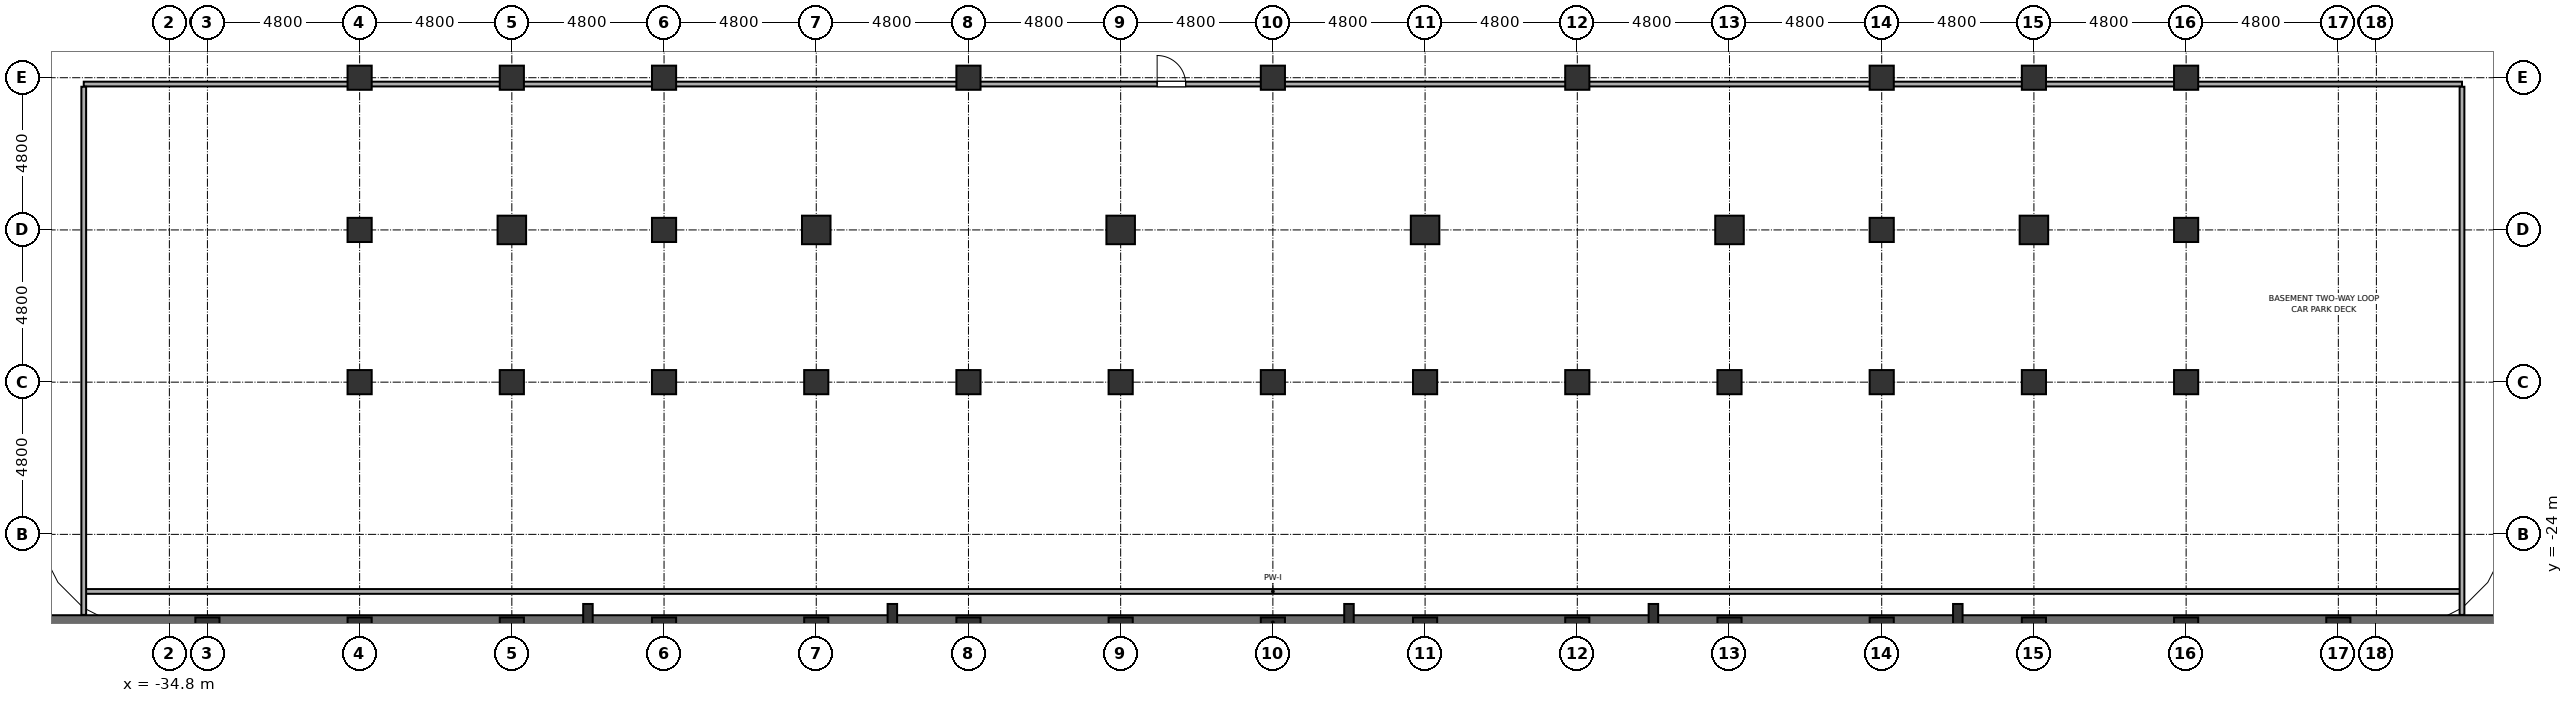
"""IFC4 building model, lengths in metres.
Left out: names, types, materials, properties, quantities, classifications, styles, units other than length and angle.
Written with IfcOpenShell. Run it as: python <this file> out.ifc"""

import sys

from ifc_helpers import new_model, si_unit, direction, frame, frame_2d, origin, origin_2d, place, context, subcontext, project, spatial, rectangle, hollow_rectangle, hollow_circle, i_section, extrude, element, fill, save


model = new_model("IFC4")
c1 = context("Model", 3, precision=1e-05, world=origin(), true_north=direction((0.0, 1.0)))
c2 = subcontext(c1, "Body", "Model", "MODEL_VIEW")
j1 = project(units=[si_unit("LENGTHUNIT", "METRE"), si_unit("PLANEANGLEUNIT", "RADIAN")], contexts=[c1])
p1 = place(None, origin())
s1 = spatial("IfcSite", under=j1, at=p1, CompositionType="ELEMENT")
p2 = place(p1, origin())
s2 = spatial("IfcBuilding", under=s1, at=p2, CompositionType="ELEMENT")
p3 = place(p2, frame((0.0, 0.0, -10.2)))
s3 = spatial("IfcBuildingStorey", under=s2, at=p3, CompositionType="ELEMENT", Elevation=-10.2)
for number, where, z_axis, x_axis in (
    (1, (-33.6, -27.0, -0.25), (0.0, 0.0, 1.0), (1.0, 0.0, 0.0)),
    (2, (-28.8, -27.0, -0.25), (0.0, 0.0, 1.0), (1.0, 0.0, 0.0)),
    (3, (-28.8, -19.2, -0.25), (0.0, 0.0, 1.0), (1.0, 0.0, 0.0)),
    (4, (-28.8, -14.4, -0.25), (0.0, 0.0, 1.0), (1.0, 0.0, 0.0)),
    (5, (-28.8, -9.6, -0.25), (0.0, 0.0, 1.0), (1.0, 0.0, 0.0)),
    (6, (-24.0, -27.0, -0.25), (0.0, 0.0, 1.0), (1.0, 0.0, 0.0)),
    (7, (-24.0, -19.2, -0.25), (0.0, 0.0, 1.0), (1.0, 0.0, 0.0)),
):
    element("IfcColumn", number, at=place(p3, frame(where, z_axis=z_axis, x_axis=x_axis)), inside=s3, PredefinedType="COLUMN", context=c2, shape_type="SweptSolid", body=[
        extrude(hollow_circle(Radius=0.381, WallThickness=0.032, at=origin_2d()), origin(), (0.0, 0.0, 1.0), 5.05),
    ])
p4 = place(p3, frame((-24.0, -14.4, -0.25), z_axis=(0.0, 0.0, 1.0), x_axis=(1.0, 0.0, 0.0)))
e8 = element("IfcColumn", 8, at=p4, inside=s3, PredefinedType="COLUMN", context=c2, shape_type="SweptSolid", body=[
    extrude(hollow_rectangle(XDim=0.9, YDim=0.9, WallThickness=0.04, at=origin_2d()), origin(), (0.0, 0.0, 1.0), 5.05),
])
for number, where, z_axis, x_axis in (
    (9, (-24.0, -9.6, -0.25), (0.0, 0.0, 1.0), (1.0, 0.0, 0.0)),
    (10, (-19.2, -27.0, -0.25), (0.0, 0.0, 1.0), (1.0, 0.0, 0.0)),
    (11, (-19.2, -19.2, -0.25), (0.0, 0.0, 1.0), (1.0, 0.0, 0.0)),
    (12, (-19.2, -14.4, -0.25), (0.0, 0.0, 1.0), (1.0, 0.0, 0.0)),
    (13, (-19.2, -9.6, -0.25), (0.0, 0.0, 1.0), (1.0, 0.0, 0.0)),
    (14, (-14.4, -27.0, -0.25), (0.0, 0.0, 1.0), (1.0, 0.0, 0.0)),
    (15, (-14.4, -19.2, -0.25), (0.0, 0.0, 1.0), (1.0, 0.0, 0.0)),
):
    element("IfcColumn", number, at=place(p3, frame(where, z_axis=z_axis, x_axis=x_axis)), inside=s3, PredefinedType="COLUMN", context=c2, shape_type="SweptSolid", body=[
        extrude(hollow_circle(Radius=0.381, WallThickness=0.032, at=origin_2d()), origin(), (0.0, 0.0, 1.0), 5.05),
    ])
p5 = place(p3, frame((-14.4, -14.4, -0.25), z_axis=(0.0, 0.0, 1.0), x_axis=(1.0, 0.0, 0.0)))
e16 = element("IfcColumn", 16, at=p5, inside=s3, PredefinedType="COLUMN", context=c2, shape_type="SweptSolid", body=[
    extrude(hollow_rectangle(XDim=0.9, YDim=0.9, WallThickness=0.04, at=origin_2d()), origin(), (0.0, 0.0, 1.0), 5.05),
])
for number, where, z_axis, x_axis in (
    (17, (-9.6, -27.0, -0.25), (0.0, 0.0, 1.0), (1.0, 0.0, 0.0)),
    (18, (-9.6, -19.2, -0.25), (0.0, 0.0, 1.0), (1.0, 0.0, 0.0)),
    (19, (-9.6, -9.6, -0.25), (0.0, 0.0, 1.0), (1.0, 0.0, 0.0)),
    (20, (-4.8, -27.0, -0.25), (0.0, 0.0, 1.0), (1.0, 0.0, 0.0)),
    (21, (-4.8, -19.2, -0.25), (0.0, 0.0, 1.0), (1.0, 0.0, 0.0)),
):
    element("IfcColumn", number, at=place(p3, frame(where, z_axis=z_axis, x_axis=x_axis)), inside=s3, PredefinedType="COLUMN", context=c2, shape_type="SweptSolid", body=[
        extrude(hollow_circle(Radius=0.381, WallThickness=0.032, at=origin_2d()), origin(), (0.0, 0.0, 1.0), 5.05),
    ])
p6 = place(p3, frame((-4.8, -14.4, -0.25), z_axis=(0.0, 0.0, 1.0), x_axis=(1.0, 0.0, 0.0)))
e22 = element("IfcColumn", 22, at=p6, inside=s3, PredefinedType="COLUMN", context=c2, shape_type="SweptSolid", body=[
    extrude(hollow_rectangle(XDim=0.9, YDim=0.9, WallThickness=0.04, at=origin_2d()), origin(), (0.0, 0.0, 1.0), 5.05),
])
for number, where, z_axis, x_axis in (
    (23, (0.0, -27.0, -0.25), (0.0, 0.0, 1.0), (1.0, 0.0, 0.0)),
    (24, (0.0, -19.2, -0.25), (0.0, 0.0, 1.0), (1.0, 0.0, 0.0)),
    (25, (0.0, -9.6, -0.25), (0.0, 0.0, 1.0), (1.0, 0.0, 0.0)),
    (26, (4.8, -27.0, -0.25), (0.0, 0.0, 1.0), (1.0, 0.0, 0.0)),
    (27, (4.8, -19.2, -0.25), (0.0, 0.0, 1.0), (1.0, 0.0, 0.0)),
):
    element("IfcColumn", number, at=place(p3, frame(where, z_axis=z_axis, x_axis=x_axis)), inside=s3, PredefinedType="COLUMN", context=c2, shape_type="SweptSolid", body=[
        extrude(hollow_circle(Radius=0.381, WallThickness=0.032, at=origin_2d()), origin(), (0.0, 0.0, 1.0), 5.05),
    ])
p7 = place(p3, frame((4.8, -14.4, -0.25), z_axis=(0.0, 0.0, 1.0), x_axis=(1.0, 0.0, 0.0)))
e28 = element("IfcColumn", 28, at=p7, inside=s3, PredefinedType="COLUMN", context=c2, shape_type="SweptSolid", body=[
    extrude(hollow_rectangle(XDim=0.9, YDim=0.9, WallThickness=0.04, at=origin_2d()), origin(), (0.0, 0.0, 1.0), 5.05),
])
for number, where, z_axis, x_axis in (
    (29, (9.6, -27.0, -0.25), (0.0, 0.0, 1.0), (1.0, 0.0, 0.0)),
    (30, (9.6, -19.2, -0.25), (0.0, 0.0, 1.0), (1.0, 0.0, 0.0)),
    (31, (9.6, -9.6, -0.25), (0.0, 0.0, 1.0), (1.0, 0.0, 0.0)),
    (32, (14.4, -27.0, -0.25), (0.0, 0.0, 1.0), (1.0, 0.0, 0.0)),
    (33, (14.4, -19.2, -0.25), (0.0, 0.0, 1.0), (1.0, 0.0, 0.0)),
):
    element("IfcColumn", number, at=place(p3, frame(where, z_axis=z_axis, x_axis=x_axis)), inside=s3, PredefinedType="COLUMN", context=c2, shape_type="SweptSolid", body=[
        extrude(hollow_circle(Radius=0.381, WallThickness=0.032, at=origin_2d()), origin(), (0.0, 0.0, 1.0), 5.05),
    ])
p8 = place(p3, frame((14.4, -14.4, -0.25), z_axis=(0.0, 0.0, 1.0), x_axis=(1.0, 0.0, 0.0)))
e34 = element("IfcColumn", 34, at=p8, inside=s3, PredefinedType="COLUMN", context=c2, shape_type="SweptSolid", body=[
    extrude(hollow_rectangle(XDim=0.9, YDim=0.9, WallThickness=0.04, at=origin_2d()), origin(), (0.0, 0.0, 1.0), 5.05),
])
for number, where, z_axis, x_axis in (
    (35, (19.2, -27.0, -0.25), (0.0, 0.0, 1.0), (1.0, 0.0, 0.0)),
    (36, (19.2, -19.2, -0.25), (0.0, 0.0, 1.0), (1.0, 0.0, 0.0)),
    (37, (19.2, -14.4, -0.25), (0.0, 0.0, 1.0), (1.0, 0.0, 0.0)),
    (38, (19.2, -9.6, -0.25), (0.0, 0.0, 1.0), (1.0, 0.0, 0.0)),
    (39, (24.0, -27.0, -0.25), (0.0, 0.0, 1.0), (1.0, 0.0, 0.0)),
    (40, (24.0, -19.2, -0.25), (0.0, 0.0, 1.0), (1.0, 0.0, 0.0)),
):
    element("IfcColumn", number, at=place(p3, frame(where, z_axis=z_axis, x_axis=x_axis)), inside=s3, PredefinedType="COLUMN", context=c2, shape_type="SweptSolid", body=[
        extrude(hollow_circle(Radius=0.381, WallThickness=0.032, at=origin_2d()), origin(), (0.0, 0.0, 1.0), 5.05),
    ])
p9 = place(p3, frame((24.0, -14.4, -0.25), z_axis=(0.0, 0.0, 1.0), x_axis=(1.0, 0.0, 0.0)))
e41 = element("IfcColumn", 41, at=p9, inside=s3, PredefinedType="COLUMN", context=c2, shape_type="SweptSolid", body=[
    extrude(hollow_rectangle(XDim=0.9, YDim=0.9, WallThickness=0.04, at=origin_2d()), origin(), (0.0, 0.0, 1.0), 5.05),
])
for number, where, z_axis, x_axis in (
    (42, (24.0, -9.6, -0.25), (0.0, 0.0, 1.0), (1.0, 0.0, 0.0)),
    (43, (28.8, -27.0, -0.25), (0.0, 0.0, 1.0), (1.0, 0.0, 0.0)),
    (44, (28.8, -19.2, -0.25), (0.0, 0.0, 1.0), (1.0, 0.0, 0.0)),
    (45, (28.8, -14.4, -0.25), (0.0, 0.0, 1.0), (1.0, 0.0, 0.0)),
    (46, (28.8, -9.6, -0.25), (0.0, 0.0, 1.0), (1.0, 0.0, 0.0)),
    (47, (33.6, -27.0, -0.25), (0.0, 0.0, 1.0), (1.0, 0.0, 0.0)),
):
    element("IfcColumn", number, at=place(p3, frame(where, z_axis=z_axis, x_axis=x_axis)), inside=s3, PredefinedType="COLUMN", context=c2, shape_type="SweptSolid", body=[
        extrude(hollow_circle(Radius=0.381, WallThickness=0.032, at=origin_2d()), origin(), (0.0, 0.0, 1.0), 5.05),
    ])
for number, where, z_axis, x_axis in (
    (48, (-21.6, -26.52, -0.25), (0.0, 0.0, 1.0), (1.0, 0.0, 0.0)),
    (49, (-12.0, -26.52, -0.25), (0.0, 0.0, 1.0), (1.0, 0.0, 0.0)),
    (50, (2.4, -26.52, -0.25), (0.0, 0.0, 1.0), (1.0, 0.0, 0.0)),
    (51, (12.0, -26.52, -0.25), (0.0, 0.0, 1.0), (1.0, 0.0, 0.0)),
    (52, (21.6, -26.52, -0.25), (0.0, 0.0, 1.0), (1.0, 0.0, 0.0)),
):
    element("IfcColumn", number, at=place(p3, frame(where, z_axis=z_axis, x_axis=x_axis)), inside=s3, PredefinedType="PILASTER", context=c2, shape_type="SweptSolid", body=[
        extrude(i_section(OverallWidth=0.3, OverallDepth=0.65, WebThickness=0.016, FlangeThickness=0.031, at=origin_2d()), origin(), (0.0, 0.0, 1.0), 5.05),
    ])
p10 = place(p3, frame((-39.0, -26.775, -0.25), z_axis=(0.0, 0.0, 1.0), x_axis=(1.0, 0.0, 0.0)))
e53 = element("IfcWall", 53, at=p10, inside=s3, PredefinedType="SOLIDWALL", context=c2, shape_type="SweptSolid", body=[
    extrude(rectangle(XDim=78.0, YDim=0.45, at=frame_2d((39.0, 0.0))), origin(), (0.0, 0.0, 1.0), 4.8),
])
p11 = place(p3, frame((-37.5, -25.8, 0.0), z_axis=(0.0, 0.0, 1.0), x_axis=(1.0, 0.0, 0.0)))
e54 = element("IfcWall", 54, at=p11, inside=s3, PredefinedType="PARTITIONING", context=c2, shape_type="SweptSolid", body=[
    extrude(rectangle(XDim=75.0, YDim=0.15, at=frame_2d((37.5, 0.0))), origin(), (0.0, 0.0, 1.0), 3.15),
])
p12 = place(p3, frame((-37.5, -9.8, 0.0), z_axis=(0.0, 0.0, 1.0), x_axis=(1.0, 0.0, 0.0)))
e55 = element("IfcWall", 55, at=p12, inside=s3, PredefinedType="PARTITIONING", context=c2, shape_type="SweptSolid", body=[
    extrude(rectangle(XDim=75.0, YDim=0.15, at=frame_2d((37.5, 0.0))), origin(), (0.0, 0.0, 1.0), 2.15),
])
p13 = place(p12, frame((33.85, 0.0, 0.0)))
e56 = element("IfcOpeningElement", 56, at=p13, cuts=e55, PredefinedType="OPENING", context=c2, shape_type="SweptSolid", body=[
    extrude(rectangle(XDim=0.9, YDim=2.02, at=frame_2d((0.45, 1.01))), frame((0.0, 0.09, 0.0), z_axis=(0.0, -1.0, 0.0), x_axis=(1.0, 0.0, 0.0)), (0.0, 0.0, 1.0), 0.18),
])
for number, where, z_axis, x_axis in (
    (57, (-37.5, -26.54, 0.0), (0.0, 0.0, 1.0), (0.0, 1.0, 0.0)),
    (58, (37.5, -26.54, 0.0), (0.0, 0.0, 1.0), (0.0, 1.0, 0.0)),
):
    element("IfcWall", number, at=place(p3, frame(where, z_axis=z_axis, x_axis=x_axis)), inside=s3, PredefinedType="PARTITIONING", context=c2, shape_type="SweptSolid", body=[
        extrude(rectangle(XDim=16.655, YDim=0.15, at=frame_2d((8.328, 0.0))), origin(), (0.0, 0.0, 1.0), 3.15),
    ])
p14 = place(p13, origin())
e59 = element("IfcDoor", 59, at=p14, inside=s3, OperationType="SINGLE_SWING_LEFT", PredefinedType="DOOR", context=c2, shape_type="SweptSolid", body=[
    extrude(rectangle(XDim=0.9, YDim=2.02, at=frame_2d((0.45, 1.01))), frame((0.0, 0.025, 0.0), z_axis=(0.0, -1.0, 0.0), x_axis=(1.0, 0.0, 0.0)), (0.0, 0.0, 1.0), 0.05),
])
fill(e56, e59)
save(model, sys.argv[1])
